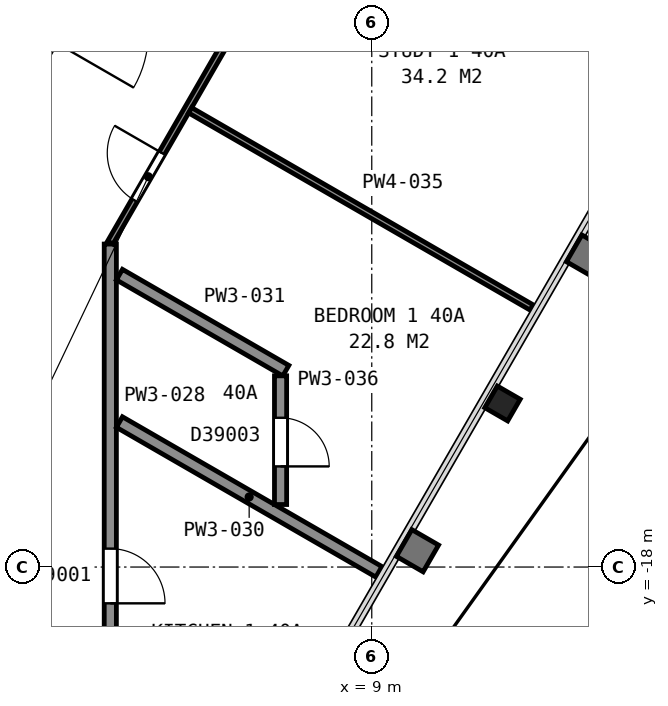
"""IFC4 building model, lengths in metres.
Left out: names, types, materials, properties, quantities, classifications, styles, units other than length and angle.
Written with IfcOpenShell. Run it as: python <this file> out.ifc"""

import sys

from ifc_helpers import new_model, si_unit, direction, frame, frame_2d, origin, origin_2d, place, context, subcontext, project, spatial, rectangle, i_section, extrude, element, fill, save


model = new_model("IFC4")
c1 = context("Model", 3, precision=1e-05, world=origin(), true_north=direction((0.0, 1.0)))
c2 = subcontext(c1, "Body", "Model", "MODEL_VIEW")
j1 = project(units=[si_unit("LENGTHUNIT", "METRE"), si_unit("PLANEANGLEUNIT", "RADIAN")], contexts=[c1])
p1 = place(None, origin())
s1 = spatial("IfcSite", under=j1, at=p1, CompositionType="ELEMENT")
p2 = place(p1, origin())
s2 = spatial("IfcBuilding", under=s1, at=p2, CompositionType="ELEMENT")
p3 = place(p2, frame((0.0, 0.0, 163.6)))
s3 = spatial("IfcBuildingStorey", under=s2, at=p3, CompositionType="ELEMENT", Elevation=163.6)
p4 = place(p3, frame((11.15, -15.31, 0.0), z_axis=(0.0, 0.0, 1.0), x_axis=(-0.5, -0.866025403784, 0.0)))
e1 = element("IfcColumn", 1, at=p4, inside=s3, PredefinedType="COLUMN", context=c2, shape_type="SweptSolid", body=[
    extrude(i_section(OverallWidth=0.411, OverallDepth=0.434, WebThickness=0.036, FlangeThickness=0.057, FilletRadius=0.015, at=origin_2d()), origin(), (0.0, 0.0, 1.0), 3.7),
])
p5 = place(p3, frame((1.677, -12.415, 0.0), z_axis=(0.0, 0.0, 1.0), x_axis=(0.500054337157, 0.865994029939, 0.0)))
e2 = element("IfcWall", 2, at=p5, inside=s3, PredefinedType="PARTITIONING", context=c2, shape_type="SweptSolid", body=[
    extrude(rectangle(XDim=6.177, YDim=0.2, at=frame_2d((3.088, 0.0))), origin(), (0.0, 0.0, 1.0), 3.45),
])
p6 = place(p5, frame((3.695, 0.0, 0.0)))
e3 = element("IfcOpeningElement", 3, at=p6, cuts=e2, PredefinedType="OPENING", context=c2, shape_type="SweptSolid", body=[
    extrude(rectangle(XDim=1.8, YDim=2.1, at=frame_2d((0.9, 1.05))), frame((0.0, 0.11, 0.0), z_axis=(0.0, -1.0, 0.0), x_axis=(1.0, 0.0, 0.0)), (0.0, 0.0, 1.0), 0.22),
])
p7 = place(p3, frame((4.7, -12.688, 0.0), z_axis=(0.0, 0.0, 1.0), x_axis=(0.0, -1.0, 0.0)))
e4 = element("IfcWall", 4, at=p7, inside=s3, PredefinedType="PARTITIONING", context=c2, shape_type="SweptSolid", body=[
    extrude(rectangle(XDim=8.562, YDim=0.2, at=frame_2d((4.281, 0.0))), origin(), (0.0, 0.0, 1.0), 2.713),
])
p8 = place(p7, frame((5.009, 0.0, 0.0)))
e5 = element("IfcOpeningElement", 5, at=p8, cuts=e4, PredefinedType="OPENING", context=c2, shape_type="SweptSolid", body=[
    extrude(rectangle(XDim=0.9, YDim=2.1, at=frame_2d((0.45, 1.05))), frame((0.0, 0.11, 0.0), z_axis=(0.0, -1.0, 0.0), x_axis=(1.0, 0.0, 0.0)), (0.0, 0.0, 1.0), 0.22),
])
p9 = place(p3, frame((4.85, -15.615, 0.0), z_axis=(0.0, 0.0, 1.0), x_axis=(0.866057699548, -0.499944057923, 0.0)))
e6 = element("IfcWall", 6, at=p9, inside=s3, PredefinedType="PARTITIONING", context=c2, shape_type="SweptSolid", body=[
    extrude(rectangle(XDim=4.927, YDim=0.2, at=frame_2d((2.464, 0.0))), origin(), (0.0, 0.0, 1.0), 2.713),
])
p10 = place(p3, frame((4.85, -13.191, 0.0), z_axis=(0.0, 0.0, 1.0), x_axis=(0.866109679077, -0.499854002494, 0.0)))
e7 = element("IfcWall", 7, at=p10, inside=s3, PredefinedType="PARTITIONING", context=c2, shape_type="SweptSolid", body=[
    extrude(rectangle(XDim=3.16, YDim=0.2, at=frame_2d((1.58, 0.0))), origin(), (0.0, 0.0, 1.0), 2.713),
])
p11 = place(p3, frame((13.342, 2.306, 0.0), z_axis=(0.0, 0.0, 1.0), x_axis=(-0.49997635812, -0.866039053, 0.0)))
e8 = element("IfcWall", 8, at=p11, inside=s3, PredefinedType="PARTITIONING", context=c2, shape_type="SweptSolid", body=[
    extrude(rectangle(XDim=17.285, YDim=0.1, at=frame_2d((8.643, 0.0))), origin(), (0.0, 0.0, 1.0), 2.713),
])
p12 = place(p11, frame((15.585, 0.0, 0.0)))
e9 = element("IfcOpeningElement", 9, at=p12, cuts=e8, PredefinedType="OPENING", context=c2, shape_type="SweptSolid", body=[
    extrude(rectangle(XDim=0.9, YDim=2.1, at=frame_2d((0.45, 1.05))), frame((0.0, 0.06, 0.0), z_axis=(0.0, -1.0, 0.0), x_axis=(1.0, 0.0, 0.0)), (0.0, 0.0, 1.0), 0.12),
])
p13 = place(p11, frame((11.595, 0.0, 0.0)))
e10 = element("IfcOpeningElement", 10, at=p13, cuts=e8, PredefinedType="OPENING", context=c2, shape_type="SweptSolid", body=[
    extrude(rectangle(XDim=0.9, YDim=2.1, at=frame_2d((0.45, 1.05))), frame((0.0, 0.06, 0.0), z_axis=(0.0, -1.0, 0.0), x_axis=(1.0, 0.0, 0.0)), (0.0, 0.0, 1.0), 0.12),
])
p14 = place(p11, frame((6.171, 0.0, 0.0)))
e11 = element("IfcOpeningElement", 11, at=p14, cuts=e8, PredefinedType="OPENING", context=c2, shape_type="SweptSolid", body=[
    extrude(rectangle(XDim=0.9, YDim=2.1, at=frame_2d((0.45, 1.05))), frame((0.0, 0.06, 0.0), z_axis=(0.0, -1.0, 0.0), x_axis=(1.0, 0.0, 0.0)), (0.0, 0.0, 1.0), 0.12),
])
p15 = place(p3, frame((6.013, -10.488, 0.0), z_axis=(0.0, 0.0, 1.0), x_axis=(0.86599118531, -0.500059263454, 0.0)))
e12 = element("IfcWall", 12, at=p15, inside=s3, PredefinedType="PARTITIONING", context=c2, shape_type="SweptSolid", body=[
    extrude(rectangle(XDim=6.484, YDim=0.1, at=frame_2d((3.242, 0.0))), origin(), (0.0, 0.0, 1.0), 2.713),
])
p16 = place(p3, frame((7.5, -16.972, 0.0), z_axis=(0.0, 0.0, 1.0), x_axis=(0.0, 1.0, 0.0)))
e13 = element("IfcWall", 13, at=p16, inside=s3, PredefinedType="PARTITIONING", context=c2, shape_type="SweptSolid", body=[
    extrude(rectangle(XDim=2.117, YDim=0.2, at=frame_2d((1.059, 0.0))), origin(), (0.0, 0.0, 1.0), 2.713),
])
p17 = place(p16, frame((0.627, 0.0, 0.0)))
e14 = element("IfcOpeningElement", 14, at=p17, cuts=e13, PredefinedType="OPENING", context=c2, shape_type="SweptSolid", body=[
    extrude(rectangle(XDim=0.8, YDim=2.1, at=frame_2d((0.4, 1.05))), frame((0.0, 0.11, 0.0), z_axis=(0.0, -1.0, 0.0), x_axis=(1.0, 0.0, 0.0)), (0.0, 0.0, 1.0), 0.22),
])
p18 = place(p8, origin())
e15 = element("IfcDoor", 15, at=p18, inside=s3, OperationType="SINGLE_SWING_RIGHT", PredefinedType="DOOR", context=c2, shape_type="SweptSolid", body=[
    extrude(rectangle(XDim=0.9, YDim=2.1, at=frame_2d((0.45, 1.05))), frame((0.0, 0.025, 0.0), z_axis=(0.0, -1.0, 0.0), x_axis=(1.0, 0.0, 0.0)), (0.0, 0.0, 1.0), 0.05),
])
fill(e5, e15)
p19 = place(p12, origin())
e16 = element("IfcDoor", 16, at=p19, inside=s3, OperationType="SINGLE_SWING_LEFT", PredefinedType="DOOR", context=c2, shape_type="SweptSolid", body=[
    extrude(rectangle(XDim=0.9, YDim=2.1, at=frame_2d((0.45, 1.05))), frame((0.0, 0.025, 0.0), z_axis=(0.0, -1.0, 0.0), x_axis=(1.0, 0.0, 0.0)), (0.0, 0.0, 1.0), 0.05),
])
fill(e9, e16)
p20 = place(p17, origin())
e17 = element("IfcDoor", 17, at=p20, inside=s3, OperationType="SINGLE_SWING_LEFT", PredefinedType="DOOR", context=c2, shape_type="SweptSolid", body=[
    extrude(rectangle(XDim=0.8, YDim=2.1, at=frame_2d((0.4, 1.05))), frame((0.0, 0.025, 0.0), z_axis=(0.0, -1.0, 0.0), x_axis=(1.0, 0.0, 0.0)), (0.0, 0.0, 1.0), 0.05),
])
fill(e14, e17)
save(model, sys.argv[1])
